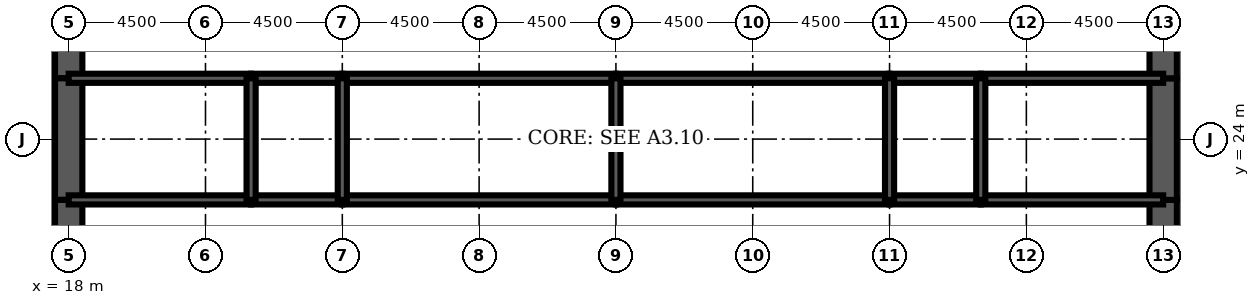
"""IFC4 building model, lengths in metres.
Left out: names, types, materials, properties, quantities, classifications, styles, units other than length and angle.
Written with IfcOpenShell. Run it as: python <this file> out.ifc"""

import sys

from ifc_helpers import new_model, si_unit, direction, frame, frame_2d, origin, place, context, subcontext, project, spatial, rectangle, extrude, element, fill, save


model = new_model("IFC4")
c1 = context("Model", 3, precision=1e-05, world=origin(), true_north=direction((0.0, 1.0)))
c2 = subcontext(c1, "Body", "Model", "MODEL_VIEW")
j1 = project(units=[si_unit("LENGTHUNIT", "METRE"), si_unit("PLANEANGLEUNIT", "RADIAN")], contexts=[c1])
p1 = place(None, origin())
s1 = spatial("IfcSite", under=j1, at=p1, CompositionType="ELEMENT")
p2 = place(p1, origin())
s2 = spatial("IfcBuilding", under=s1, at=p2, CompositionType="ELEMENT")
p3 = place(p2, frame((0.0, 0.0, 41.0)))
s3 = spatial("IfcBuildingStorey", under=s2, at=p3, CompositionType="ELEMENT", Elevation=41.0)
p4 = place(p3, frame((18.0, 28.8, 0.0), z_axis=(0.0, 0.0, 1.0), x_axis=(0.0, -1.0, 0.0)))
e1 = element("IfcWall", 1, at=p4, inside=s3, PredefinedType="SHEAR", context=c2, shape_type="SweptSolid", body=[
    extrude(rectangle(XDim=2.8, YDim=0.9, at=frame_2d((1.4, 0.0))), origin(), (0.0, 0.0, 1.0), 4.5),
])
p5 = place(p4, frame((0.4, 0.0, 0.0)))
e2 = element("IfcOpeningElement", 2, at=p5, cuts=e1, PredefinedType="OPENING", context=c2, shape_type="SweptSolid", body=[
    extrude(rectangle(XDim=1.8, YDim=2.1, at=frame_2d((0.9, 1.05))), frame((0.0, 0.46, 0.0), z_axis=(0.0, -1.0, 0.0), x_axis=(1.0, 0.0, 0.0)), (0.0, 0.0, 1.0), 0.92),
])
p6 = place(p3, frame((18.0, 26.0, 0.0), z_axis=(0.0, 0.0, 1.0), x_axis=(0.0, -1.0, 0.0)))
e3 = element("IfcWall", 3, at=p6, inside=s3, PredefinedType="SHEAR", context=c2, shape_type="SweptSolid", body=[
    extrude(rectangle(XDim=4.0, YDim=0.9, at=frame_2d((2.0, 0.0))), origin(), (0.0, 0.0, 1.0), 4.5),
])
p7 = place(p3, frame((18.0, 22.0, 0.0), z_axis=(0.0, 0.0, 1.0), x_axis=(0.0, -1.0, 0.0)))
e4 = element("IfcWall", 4, at=p7, inside=s3, PredefinedType="SHEAR", context=c2, shape_type="SweptSolid", body=[
    extrude(rectangle(XDim=2.8, YDim=0.9, at=frame_2d((1.4, 0.0))), origin(), (0.0, 0.0, 1.0), 4.5),
])
p8 = place(p7, frame((0.6, 0.0, 0.0)))
e5 = element("IfcOpeningElement", 5, at=p8, cuts=e4, PredefinedType="OPENING", context=c2, shape_type="SweptSolid", body=[
    extrude(rectangle(XDim=1.8, YDim=2.1, at=frame_2d((0.9, 1.05))), frame((0.0, 0.46, 0.0), z_axis=(0.0, -1.0, 0.0), x_axis=(1.0, 0.0, 0.0)), (0.0, 0.0, 1.0), 0.92),
])
p9 = place(p3, frame((54.0, 19.2, 0.0), z_axis=(0.0, 0.0, 1.0), x_axis=(0.0, 1.0, 0.0)))
e6 = element("IfcWall", 6, at=p9, inside=s3, PredefinedType="SHEAR", context=c2, shape_type="SweptSolid", body=[
    extrude(rectangle(XDim=2.8, YDim=0.9, at=frame_2d((1.4, 0.0))), origin(), (0.0, 0.0, 1.0), 4.5),
])
p10 = place(p9, frame((0.4, 0.0, 0.0)))
e7 = element("IfcOpeningElement", 7, at=p10, cuts=e6, PredefinedType="OPENING", context=c2, shape_type="SweptSolid", body=[
    extrude(rectangle(XDim=1.8, YDim=2.1, at=frame_2d((0.9, 1.05))), frame((0.0, 0.46, 0.0), z_axis=(0.0, -1.0, 0.0), x_axis=(1.0, 0.0, 0.0)), (0.0, 0.0, 1.0), 0.92),
])
p11 = place(p3, frame((54.0, 22.0, 0.0), z_axis=(0.0, 0.0, 1.0), x_axis=(0.0, 1.0, 0.0)))
e8 = element("IfcWall", 8, at=p11, inside=s3, PredefinedType="SHEAR", context=c2, shape_type="SweptSolid", body=[
    extrude(rectangle(XDim=4.0, YDim=0.9, at=frame_2d((2.0, 0.0))), origin(), (0.0, 0.0, 1.0), 4.5),
])
p12 = place(p3, frame((54.0, 26.0, 0.0), z_axis=(0.0, 0.0, 1.0), x_axis=(0.0, 1.0, 0.0)))
e9 = element("IfcWall", 9, at=p12, inside=s3, PredefinedType="SHEAR", context=c2, shape_type="SweptSolid", body=[
    extrude(rectangle(XDim=2.8, YDim=0.9, at=frame_2d((1.4, 0.0))), origin(), (0.0, 0.0, 1.0), 4.5),
])
p13 = place(p12, frame((0.6, 0.0, 0.0)))
e10 = element("IfcOpeningElement", 10, at=p13, cuts=e9, PredefinedType="OPENING", context=c2, shape_type="SweptSolid", body=[
    extrude(rectangle(XDim=1.8, YDim=2.1, at=frame_2d((0.9, 1.05))), frame((0.0, 0.46, 0.0), z_axis=(0.0, -1.0, 0.0), x_axis=(1.0, 0.0, 0.0)), (0.0, 0.0, 1.0), 0.92),
])
p14 = place(p3, frame((18.0, 22.0, 0.0), z_axis=(0.0, 0.0, 1.0), x_axis=(1.0, 0.0, 0.0)))
e11 = element("IfcWall", 11, at=p14, inside=s3, PredefinedType="SOLIDWALL", context=c2, shape_type="SweptSolid", body=[
    extrude(rectangle(XDim=6.0, YDim=0.3, at=frame_2d((3.0, 0.0))), origin(), (0.0, 0.0, 1.0), 4.5),
])
p15 = place(p14, frame((4.4, 0.0, 0.0)))
e12 = element("IfcOpeningElement", 12, at=p15, cuts=e11, PredefinedType="OPENING", context=c2, shape_type="SweptSolid", body=[
    extrude(rectangle(XDim=1.0, YDim=2.1, at=frame_2d((0.5, 1.05))), frame((0.0, 0.16, 0.0), z_axis=(0.0, -1.0, 0.0), x_axis=(1.0, 0.0, 0.0)), (0.0, 0.0, 1.0), 0.32),
])
p16 = place(p14, frame((0.85, 0.0, 0.0)))
e13 = element("IfcOpeningElement", 13, at=p16, cuts=e11, PredefinedType="OPENING", context=c2, shape_type="SweptSolid", body=[
    extrude(rectangle(XDim=1.0, YDim=2.1, at=frame_2d((0.5, 1.05))), frame((0.0, 0.16, 0.0), z_axis=(0.0, -1.0, 0.0), x_axis=(1.0, 0.0, 0.0)), (0.0, 0.0, 1.0), 0.32),
])
p17 = place(p3, frame((24.0, 22.0, 0.0), z_axis=(0.0, 0.0, 1.0), x_axis=(1.0, 0.0, 0.0)))
e14 = element("IfcWall", 14, at=p17, inside=s3, PredefinedType="SOLIDWALL", context=c2, shape_type="SweptSolid", body=[
    extrude(rectangle(XDim=3.0, YDim=0.3, at=frame_2d((1.5, 0.0))), origin(), (0.0, 0.0, 1.0), 4.5),
])
p18 = place(p17, frame((1.0, 0.0, 0.0)))
e15 = element("IfcOpeningElement", 15, at=p18, cuts=e14, PredefinedType="OPENING", context=c2, shape_type="SweptSolid", body=[
    extrude(rectangle(XDim=1.0, YDim=2.1, at=frame_2d((0.5, 1.05))), frame((0.0, 0.16, 0.0), z_axis=(0.0, -1.0, 0.0), x_axis=(1.0, 0.0, 0.0)), (0.0, 0.0, 1.0), 0.32),
])
p19 = place(p3, frame((27.0, 22.0, 0.0), z_axis=(0.0, 0.0, 1.0), x_axis=(1.0, 0.0, 0.0)))
e16 = element("IfcWall", 16, at=p19, inside=s3, PredefinedType="SOLIDWALL", context=c2, shape_type="SweptSolid", body=[
    extrude(rectangle(XDim=9.0, YDim=0.3, at=frame_2d((4.5, 0.0))), origin(), (0.0, 0.0, 1.0), 4.5),
])
p20 = place(p19, frame((4.0, 0.0, 0.0)))
e17 = element("IfcOpeningElement", 17, at=p20, cuts=e16, PredefinedType="OPENING", context=c2, shape_type="SweptSolid", body=[
    extrude(rectangle(XDim=1.0, YDim=2.1, at=frame_2d((0.5, 1.05))), frame((0.0, 0.16, 0.0), z_axis=(0.0, -1.0, 0.0), x_axis=(1.0, 0.0, 0.0)), (0.0, 0.0, 1.0), 0.32),
])
p21 = place(p3, frame((36.0, 22.0, 0.0), z_axis=(0.0, 0.0, 1.0), x_axis=(1.0, 0.0, 0.0)))
e18 = element("IfcWall", 18, at=p21, inside=s3, PredefinedType="SOLIDWALL", context=c2, shape_type="SweptSolid", body=[
    extrude(rectangle(XDim=9.0, YDim=0.3, at=frame_2d((4.5, 0.0))), origin(), (0.0, 0.0, 1.0), 4.5),
])
p22 = place(p21, frame((4.0, 0.0, 0.0)))
e19 = element("IfcOpeningElement", 19, at=p22, cuts=e18, PredefinedType="OPENING", context=c2, shape_type="SweptSolid", body=[
    extrude(rectangle(XDim=1.0, YDim=2.1, at=frame_2d((0.5, 1.05))), frame((0.0, 0.16, 0.0), z_axis=(0.0, -1.0, 0.0), x_axis=(1.0, 0.0, 0.0)), (0.0, 0.0, 1.0), 0.32),
])
p23 = place(p3, frame((45.0, 22.0, 0.0), z_axis=(0.0, 0.0, 1.0), x_axis=(1.0, 0.0, 0.0)))
e20 = element("IfcWall", 20, at=p23, inside=s3, PredefinedType="SOLIDWALL", context=c2, shape_type="SweptSolid", body=[
    extrude(rectangle(XDim=3.0, YDim=0.3, at=frame_2d((1.5, 0.0))), origin(), (0.0, 0.0, 1.0), 4.5),
])
p24 = place(p23, frame((1.0, 0.0, 0.0)))
e21 = element("IfcOpeningElement", 21, at=p24, cuts=e20, PredefinedType="OPENING", context=c2, shape_type="SweptSolid", body=[
    extrude(rectangle(XDim=1.0, YDim=2.1, at=frame_2d((0.5, 1.05))), frame((0.0, 0.16, 0.0), z_axis=(0.0, -1.0, 0.0), x_axis=(1.0, 0.0, 0.0)), (0.0, 0.0, 1.0), 0.32),
])
p25 = place(p3, frame((48.0, 22.0, 0.0), z_axis=(0.0, 0.0, 1.0), x_axis=(1.0, 0.0, 0.0)))
e22 = element("IfcWall", 22, at=p25, inside=s3, PredefinedType="SOLIDWALL", context=c2, shape_type="SweptSolid", body=[
    extrude(rectangle(XDim=6.0, YDim=0.3, at=frame_2d((3.0, 0.0))), origin(), (0.0, 0.0, 1.0), 4.5),
])
p26 = place(p25, frame((2.0, 0.0, 0.0)))
e23 = element("IfcOpeningElement", 23, at=p26, cuts=e22, PredefinedType="OPENING", context=c2, shape_type="SweptSolid", body=[
    extrude(rectangle(XDim=1.0, YDim=2.1, at=frame_2d((0.5, 1.05))), frame((0.0, 0.16, 0.0), z_axis=(0.0, -1.0, 0.0), x_axis=(1.0, 0.0, 0.0)), (0.0, 0.0, 1.0), 0.32),
])
p27 = place(p25, frame((4.0, 0.0, 0.0)))
e24 = element("IfcOpeningElement", 24, at=p27, cuts=e22, PredefinedType="OPENING", context=c2, shape_type="SweptSolid", body=[
    extrude(rectangle(XDim=1.0, YDim=2.1, at=frame_2d((0.5, 1.05))), frame((0.0, 0.16, 0.0), z_axis=(0.0, -1.0, 0.0), x_axis=(1.0, 0.0, 0.0)), (0.0, 0.0, 1.0), 0.32),
])
p28 = place(p3, frame((18.0, 26.0, 0.0), z_axis=(0.0, 0.0, 1.0), x_axis=(1.0, 0.0, 0.0)))
e25 = element("IfcWall", 25, at=p28, inside=s3, PredefinedType="SOLIDWALL", context=c2, shape_type="SweptSolid", body=[
    extrude(rectangle(XDim=6.0, YDim=0.3, at=frame_2d((3.0, 0.0))), origin(), (0.0, 0.0, 1.0), 4.5),
])
p29 = place(p3, frame((24.0, 26.0, 0.0), z_axis=(0.0, 0.0, 1.0), x_axis=(1.0, 0.0, 0.0)))
e26 = element("IfcWall", 26, at=p29, inside=s3, PredefinedType="SOLIDWALL", context=c2, shape_type="SweptSolid", body=[
    extrude(rectangle(XDim=3.0, YDim=0.3, at=frame_2d((1.5, 0.0))), origin(), (0.0, 0.0, 1.0), 4.5),
])
for number, where, z_axis, x_axis in (
    (27, (27.0, 26.0, 0.0), (0.0, 0.0, 1.0), (1.0, 0.0, 0.0)),
    (28, (36.0, 26.0, 0.0), (0.0, 0.0, 1.0), (1.0, 0.0, 0.0)),
):
    element("IfcWall", number, at=place(p3, frame(where, z_axis=z_axis, x_axis=x_axis)), inside=s3, PredefinedType="SOLIDWALL", context=c2, shape_type="SweptSolid", body=[
        extrude(rectangle(XDim=9.0, YDim=0.3, at=frame_2d((4.5, 0.0))), origin(), (0.0, 0.0, 1.0), 4.5),
    ])
p30 = place(p3, frame((45.0, 26.0, 0.0), z_axis=(0.0, 0.0, 1.0), x_axis=(1.0, 0.0, 0.0)))
e29 = element("IfcWall", 29, at=p30, inside=s3, PredefinedType="SOLIDWALL", context=c2, shape_type="SweptSolid", body=[
    extrude(rectangle(XDim=3.0, YDim=0.3, at=frame_2d((1.5, 0.0))), origin(), (0.0, 0.0, 1.0), 4.5),
])
p31 = place(p3, frame((48.0, 26.0, 0.0), z_axis=(0.0, 0.0, 1.0), x_axis=(1.0, 0.0, 0.0)))
e30 = element("IfcWall", 30, at=p31, inside=s3, PredefinedType="SOLIDWALL", context=c2, shape_type="SweptSolid", body=[
    extrude(rectangle(XDim=6.0, YDim=0.3, at=frame_2d((3.0, 0.0))), origin(), (0.0, 0.0, 1.0), 4.5),
])
for number, where, z_axis, x_axis in (
    (31, (24.0, 22.0, 0.0), (0.0, 0.0, 1.0), (0.0, 1.0, 0.0)),
    (32, (27.0, 22.0, 0.0), (0.0, 0.0, 1.0), (0.0, 1.0, 0.0)),
    (33, (36.0, 22.0, 0.0), (0.0, 0.0, 1.0), (0.0, 1.0, 0.0)),
    (34, (45.0, 22.0, 0.0), (0.0, 0.0, 1.0), (0.0, 1.0, 0.0)),
    (35, (48.0, 22.0, 0.0), (0.0, 0.0, 1.0), (0.0, 1.0, 0.0)),
):
    element("IfcWall", number, at=place(p3, frame(where, z_axis=z_axis, x_axis=x_axis)), inside=s3, PredefinedType="SOLIDWALL", context=c2, shape_type="SweptSolid", body=[
        extrude(rectangle(XDim=4.0, YDim=0.3, at=frame_2d((2.0, 0.0))), origin(), (0.0, 0.0, 1.0), 4.5),
    ])
p32 = place(p3, frame((42.0, 22.15, 0.0), z_axis=(0.0, 0.0, 1.0), x_axis=(0.0, 1.0, 0.0)))
e36 = element("IfcWall", 36, at=p32, inside=s3, PredefinedType="PARTITIONING", context=c2, shape_type="SweptSolid", body=[
    extrude(rectangle(XDim=3.7, YDim=0.15, at=frame_2d((1.85, 0.0))), origin(), (0.0, 0.0, 1.0), 3.0),
])
p33 = place(p32, frame((2.2, 0.0, 0.0)))
e37 = element("IfcOpeningElement", 37, at=p33, cuts=e36, PredefinedType="OPENING", context=c2, shape_type="SweptSolid", body=[
    extrude(rectangle(XDim=1.0, YDim=2.1, at=frame_2d((0.5, 1.05))), frame((0.0, 0.085, 0.0), z_axis=(0.0, -1.0, 0.0), x_axis=(1.0, 0.0, 0.0)), (0.0, 0.0, 1.0), 0.17),
])
for number, where, z_axis, x_axis in (
    (38, (20.325, 22.15, 0.0), (0.0, 0.0, 1.0), (0.0, 1.0, 0.0)),
    (39, (51.375, 22.15, 0.0), (0.0, 0.0, 1.0), (0.0, 1.0, 0.0)),
):
    element("IfcWall", number, at=place(p3, frame(where, z_axis=z_axis, x_axis=x_axis)), inside=s3, PredefinedType="PARTITIONING", context=c2, shape_type="SweptSolid", body=[
        extrude(rectangle(XDim=3.7, YDim=0.15, at=frame_2d((1.85, 0.0))), origin(), (0.0, 0.0, 1.0), 3.0),
    ])
p34 = place(p33, origin())
e40 = element("IfcDoor", 40, at=p34, inside=s3, OperationType="SINGLE_SWING_RIGHT", PredefinedType="DOOR", context=c2, shape_type="SweptSolid", body=[
    extrude(rectangle(XDim=1.0, YDim=2.1, at=frame_2d((0.5, 1.05))), frame((0.0, 0.025, 0.0), z_axis=(0.0, -1.0, 0.0), x_axis=(1.0, 0.0, 0.0)), (0.0, 0.0, 1.0), 0.05),
])
fill(e37, e40)
p35 = place(p8, origin())
e41 = element("IfcDoor", 41, at=p35, inside=s3, OperationType="SINGLE_SWING_LEFT", PredefinedType="DOOR", context=c2, shape_type="SweptSolid", body=[
    extrude(rectangle(XDim=1.8, YDim=2.1, at=frame_2d((0.9, 1.05))), frame((0.0, 0.45, 0.0), z_axis=(0.0, -1.0, 0.0), x_axis=(1.0, 0.0, 0.0)), (0.0, 0.0, 1.0), 0.899),
])
fill(e5, e41)
p36 = place(p5, origin())
e42 = element("IfcDoor", 42, at=p36, inside=s3, OperationType="SINGLE_SWING_LEFT", PredefinedType="DOOR", context=c2, shape_type="SweptSolid", body=[
    extrude(rectangle(XDim=1.8, YDim=2.1, at=frame_2d((0.9, 1.05))), frame((0.0, 0.45, 0.0), z_axis=(0.0, -1.0, 0.0), x_axis=(1.0, 0.0, 0.0)), (0.0, 0.0, 1.0), 0.899),
])
fill(e2, e42)
p37 = place(p10, origin())
e43 = element("IfcDoor", 43, at=p37, inside=s3, OperationType="SINGLE_SWING_LEFT", PredefinedType="DOOR", context=c2, shape_type="SweptSolid", body=[
    extrude(rectangle(XDim=1.8, YDim=2.1, at=frame_2d((0.9, 1.05))), frame((0.0, 0.45, 0.0), z_axis=(0.0, -1.0, 0.0), x_axis=(1.0, 0.0, 0.0)), (0.0, 0.0, 1.0), 0.899),
])
fill(e7, e43)
p38 = place(p13, origin())
e44 = element("IfcDoor", 44, at=p38, inside=s3, OperationType="SINGLE_SWING_LEFT", PredefinedType="DOOR", context=c2, shape_type="SweptSolid", body=[
    extrude(rectangle(XDim=1.8, YDim=2.1, at=frame_2d((0.9, 1.05))), frame((0.0, 0.45, 0.0), z_axis=(0.0, -1.0, 0.0), x_axis=(1.0, 0.0, 0.0)), (0.0, 0.0, 1.0), 0.899),
])
fill(e10, e44)
p39 = place(p15, origin())
e45 = element("IfcDoor", 45, at=p39, inside=s3, OperationType="SINGLE_SWING_RIGHT", PredefinedType="DOOR", context=c2, shape_type="SweptSolid", body=[
    extrude(rectangle(XDim=1.0, YDim=2.1, at=frame_2d((0.5, 1.05))), frame((0.0, 0.025, 0.0), z_axis=(0.0, -1.0, 0.0), x_axis=(1.0, 0.0, 0.0)), (0.0, 0.0, 1.0), 0.05),
])
fill(e12, e45)
p40 = place(p18, origin())
e46 = element("IfcDoor", 46, at=p40, inside=s3, OperationType="SINGLE_SWING_LEFT", PredefinedType="DOOR", context=c2, shape_type="SweptSolid", body=[
    extrude(rectangle(XDim=1.0, YDim=2.1, at=frame_2d((0.5, 1.05))), frame((0.0, 0.025, 0.0), z_axis=(0.0, -1.0, 0.0), x_axis=(1.0, 0.0, 0.0)), (0.0, 0.0, 1.0), 0.05),
])
fill(e15, e46)
p41 = place(p20, origin())
e47 = element("IfcDoor", 47, at=p41, inside=s3, OperationType="SINGLE_SWING_LEFT", PredefinedType="DOOR", context=c2, shape_type="SweptSolid", body=[
    extrude(rectangle(XDim=1.0, YDim=2.1, at=frame_2d((0.5, 1.05))), frame((0.0, 0.025, 0.0), z_axis=(0.0, -1.0, 0.0), x_axis=(1.0, 0.0, 0.0)), (0.0, 0.0, 1.0), 0.05),
])
fill(e17, e47)
p42 = place(p22, origin())
e48 = element("IfcDoor", 48, at=p42, inside=s3, OperationType="SINGLE_SWING_LEFT", PredefinedType="DOOR", context=c2, shape_type="SweptSolid", body=[
    extrude(rectangle(XDim=1.0, YDim=2.1, at=frame_2d((0.5, 1.05))), frame((0.0, 0.025, 0.0), z_axis=(0.0, -1.0, 0.0), x_axis=(1.0, 0.0, 0.0)), (0.0, 0.0, 1.0), 0.05),
])
fill(e19, e48)
p43 = place(p24, origin())
e49 = element("IfcDoor", 49, at=p43, inside=s3, OperationType="SINGLE_SWING_LEFT", PredefinedType="DOOR", context=c2, shape_type="SweptSolid", body=[
    extrude(rectangle(XDim=1.0, YDim=2.1, at=frame_2d((0.5, 1.05))), frame((0.0, 0.025, 0.0), z_axis=(0.0, -1.0, 0.0), x_axis=(1.0, 0.0, 0.0)), (0.0, 0.0, 1.0), 0.05),
])
fill(e21, e49)
p44 = place(p26, origin())
e50 = element("IfcDoor", 50, at=p44, inside=s3, OperationType="SINGLE_SWING_LEFT", PredefinedType="DOOR", context=c2, shape_type="SweptSolid", body=[
    extrude(rectangle(XDim=1.0, YDim=2.1, at=frame_2d((0.5, 1.05))), frame((0.0, 0.025, 0.0), z_axis=(0.0, -1.0, 0.0), x_axis=(1.0, 0.0, 0.0)), (0.0, 0.0, 1.0), 0.05),
])
fill(e23, e50)
p45 = place(p16, origin())
e51 = element("IfcDoor", 51, at=p45, inside=s3, OperationType="SINGLE_SWING_LEFT", PredefinedType="DOOR", context=c2, shape_type="SweptSolid", body=[
    extrude(rectangle(XDim=1.0, YDim=2.1, at=frame_2d((0.5, 1.05))), frame((0.0, 0.025, 0.0), z_axis=(0.0, -1.0, 0.0), x_axis=(1.0, 0.0, 0.0)), (0.0, 0.0, 1.0), 0.05),
])
fill(e13, e51)
p46 = place(p27, origin())
e52 = element("IfcDoor", 52, at=p46, inside=s3, OperationType="SINGLE_SWING_RIGHT", PredefinedType="DOOR", context=c2, shape_type="SweptSolid", body=[
    extrude(rectangle(XDim=1.0, YDim=2.1, at=frame_2d((0.5, 1.05))), frame((0.0, 0.025, 0.0), z_axis=(0.0, -1.0, 0.0), x_axis=(1.0, 0.0, 0.0)), (0.0, 0.0, 1.0), 0.05),
])
fill(e24, e52)
save(model, sys.argv[1])
